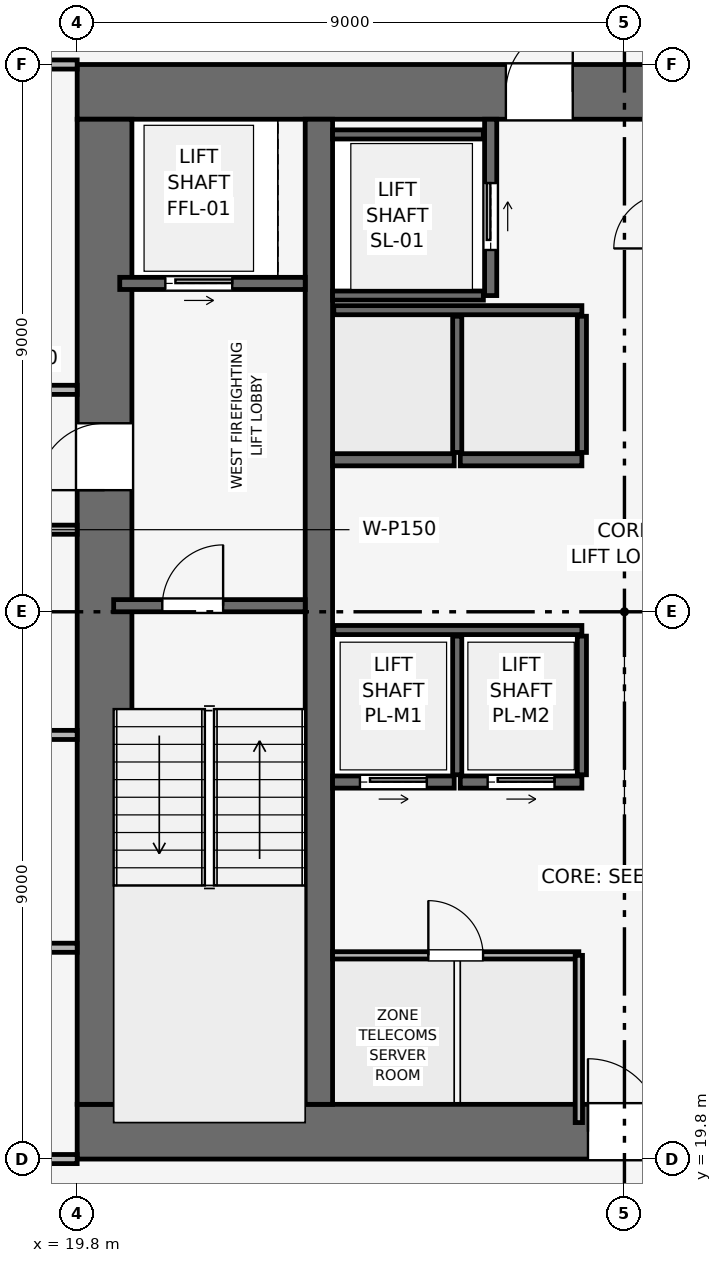
"""IFC4 building model, lengths in metres.
Left out: names, types, materials, properties, quantities, classifications, styles, units other than length and angle.
Written with IfcOpenShell. Run it as: python <this file> out.ifc"""

import sys

from ifc_helpers import new_model, si_unit, direction, frame, frame_2d, origin, place, context, subcontext, project, spatial, rectangle, extrude, element, fill, save


model = new_model("IFC4")
c1 = context("Model", 3, precision=1e-05, world=origin(), true_north=direction((0.0, 1.0)))
c2 = subcontext(c1, "Body", "Model", "MODEL_VIEW")
j1 = project(units=[si_unit("LENGTHUNIT", "METRE"), si_unit("PLANEANGLEUNIT", "RADIAN")], contexts=[c1])
p1 = place(None, origin())
s1 = spatial("IfcSite", under=j1, at=p1, CompositionType="ELEMENT")
p2 = place(p1, origin())
s2 = spatial("IfcBuilding", under=s1, at=p2, CompositionType="ELEMENT")
p3 = place(p2, frame((0.0, 0.0, 190.8)))
s3 = spatial("IfcBuildingStorey", under=s2, at=p3, CompositionType="ELEMENT", Elevation=190.8)
p4 = place(p3, frame((19.8, 20.25, 0.0), z_axis=(0.0, 0.0, 1.0), x_axis=(1.0, 0.0, 0.0)))
e1 = element("IfcWall", 1, at=p4, inside=s3, PredefinedType="SHEAR", context=c2, shape_type="SweptSolid", body=[
    extrude(rectangle(XDim=18.0, YDim=0.9, at=frame_2d((9.0, 0.0))), origin(), (0.0, 0.0, 1.0), 3.75),
])
p5 = place(p4, frame((8.4, 0.0, 0.0)))
e2 = element("IfcOpeningElement", 2, at=p5, cuts=e1, PredefinedType="OPENING", context=c2, shape_type="SweptSolid", body=[
    extrude(rectangle(XDim=1.2, YDim=2.2, at=frame_2d((0.6, 1.1))), frame((0.0, 0.46, 0.0), z_axis=(0.0, -1.0, 0.0), x_axis=(1.0, 0.0, 0.0)), (0.0, 0.0, 1.0), 0.92),
])
p6 = place(p3, frame((19.8, 37.35, 0.0), z_axis=(0.0, 0.0, 1.0), x_axis=(1.0, 0.0, 0.0)))
e3 = element("IfcWall", 3, at=p6, inside=s3, PredefinedType="SHEAR", context=c2, shape_type="SweptSolid", body=[
    extrude(rectangle(XDim=18.0, YDim=0.9, at=frame_2d((9.0, 0.0))), origin(), (0.0, 0.0, 1.0), 3.75),
])
p7 = place(p6, frame((7.05, 0.0, 0.0)))
e4 = element("IfcOpeningElement", 4, at=p7, cuts=e3, PredefinedType="OPENING", context=c2, shape_type="SweptSolid", body=[
    extrude(rectangle(XDim=1.1, YDim=2.15, at=frame_2d((0.55, 1.075))), frame((0.0, 0.46, 0.0), z_axis=(0.0, -1.0, 0.0), x_axis=(1.0, 0.0, 0.0)), (0.0, 0.0, 1.0), 0.92),
])
p8 = place(p3, frame((20.25, 20.7, 0.0), z_axis=(0.0, 0.0, 1.0), x_axis=(0.0, 1.0, 0.0)))
e5 = element("IfcWall", 5, at=p8, inside=s3, PredefinedType="SHEAR", context=c2, shape_type="SweptSolid", body=[
    extrude(rectangle(XDim=16.2, YDim=0.9, at=frame_2d((8.1, 0.0))), origin(), (0.0, 0.0, 1.0), 3.75),
])
p9 = place(p8, frame((10.1, 0.0, 0.0)))
e6 = element("IfcOpeningElement", 6, at=p9, cuts=e5, PredefinedType="OPENING", context=c2, shape_type="SweptSolid", body=[
    extrude(rectangle(XDim=1.1, YDim=2.15, at=frame_2d((0.55, 1.075))), frame((0.0, 0.46, 0.0), z_axis=(0.0, -1.0, 0.0), x_axis=(1.0, 0.0, 0.0)), (0.0, 0.0, 1.0), 0.92),
])
p10 = place(p3, frame((23.775, 20.7, 0.0), z_axis=(0.0, 0.0, 1.0), x_axis=(0.0, 1.0, 0.0)))
e7 = element("IfcWall", 7, at=p10, inside=s3, PredefinedType="SHEAR", context=c2, shape_type="SweptSolid", body=[
    extrude(rectangle(XDim=16.2, YDim=0.45, at=frame_2d((8.1, 0.0))), origin(), (0.0, 0.0, 1.0), 3.75),
])
p11 = place(p3, frame((20.4, 28.9, 0.0), z_axis=(0.0, 0.0, 1.0), x_axis=(1.0, 0.0, 0.0)))
e8 = element("IfcWall", 8, at=p11, inside=s3, PredefinedType="SHEAR", context=c2, shape_type="SweptSolid", body=[
    extrude(rectangle(XDim=3.15, YDim=0.2, at=frame_2d((1.575, 0.0))), origin(), (0.0, 0.0, 1.0), 3.35),
])
p12 = place(p11, frame((0.8, 0.0, 0.0)))
e9 = element("IfcOpeningElement", 9, at=p12, cuts=e8, PredefinedType="OPENING", context=c2, shape_type="SweptSolid", body=[
    extrude(rectangle(XDim=1.0, YDim=2.1, at=frame_2d((0.5, 1.05))), frame((0.0, 0.11, 0.0), z_axis=(0.0, -1.0, 0.0), x_axis=(1.0, 0.0, 0.0)), (0.0, 0.0, 1.0), 0.22),
])
p13 = place(p3, frame((20.5, 34.2, 0.0), z_axis=(0.0, 0.0, 1.0), x_axis=(1.0, 0.0, 0.0)))
e10 = element("IfcWall", 10, at=p13, inside=s3, PredefinedType="SHEAR", context=c2, shape_type="SweptSolid", body=[
    extrude(rectangle(XDim=3.05, YDim=0.2, at=frame_2d((1.525, 0.0))), origin(), (0.0, 0.0, 1.0), 3.35),
])
p14 = place(p13, frame((0.75, 0.0, 0.0)))
e11 = element("IfcOpeningElement", 11, at=p14, cuts=e10, PredefinedType="OPENING", context=c2, shape_type="SweptSolid", body=[
    extrude(rectangle(XDim=1.1, YDim=2.15, at=frame_2d((0.55, 1.075))), frame((0.0, 0.11, 0.0), z_axis=(0.0, -1.0, 0.0), x_axis=(1.0, 0.0, 0.0)), (0.0, 0.0, 1.0), 0.22),
])
p15 = place(p3, frame((26.6, 34.0, 0.0), z_axis=(0.0, 0.0, 1.0), x_axis=(0.0, 1.0, 0.0)))
e12 = element("IfcWall", 12, at=p15, inside=s3, PredefinedType="SHEAR", context=c2, shape_type="SweptSolid", body=[
    extrude(rectangle(XDim=2.9, YDim=0.2, at=frame_2d((1.45, 0.0))), origin(), (0.0, 0.0, 1.0), 3.35),
])
p16 = place(p15, frame((0.75, 0.0, 0.0)))
e13 = element("IfcOpeningElement", 13, at=p16, cuts=e12, PredefinedType="OPENING", context=c2, shape_type="SweptSolid", body=[
    extrude(rectangle(XDim=1.1, YDim=2.15, at=frame_2d((0.55, 1.075))), frame((0.0, 0.11, 0.0), z_axis=(0.0, -1.0, 0.0), x_axis=(1.0, 0.0, 0.0)), (0.0, 0.0, 1.0), 0.22),
])
for number, where, z_axis, x_axis in (
    (14, (24.0, 34.0, 0.0), (0.0, 0.0, 1.0), (1.0, 0.0, 0.0)),
    (15, (24.0, 36.65, 0.0), (0.0, 0.0, 1.0), (1.0, 0.0, 0.0)),
):
    element("IfcWall", number, at=place(p3, frame(where, z_axis=z_axis, x_axis=x_axis)), inside=s3, PredefinedType="SHEAR", context=c2, shape_type="SweptSolid", body=[
        extrude(rectangle(XDim=2.48, YDim=0.15, at=frame_2d((1.24, 0.0))), origin(), (0.0, 0.0, 1.0), 3.35),
    ])
p17 = place(p3, frame((24.0, 26.0, 0.0), z_axis=(0.0, 0.0, 1.0), x_axis=(1.0, 0.0, 0.0)))
e16 = element("IfcWall", 16, at=p17, inside=s3, PredefinedType="SHEAR", context=c2, shape_type="SweptSolid", body=[
    extrude(rectangle(XDim=2.0, YDim=0.2, at=frame_2d((1.0, 0.0))), origin(), (0.0, 0.0, 1.0), 3.35),
])
p18 = place(p17, frame((0.45, 0.0, 0.0)))
e17 = element("IfcOpeningElement", 17, at=p18, cuts=e16, PredefinedType="OPENING", context=c2, shape_type="SweptSolid", body=[
    extrude(rectangle(XDim=1.1, YDim=2.15, at=frame_2d((0.55, 1.075))), frame((0.0, 0.11, 0.0), z_axis=(0.0, -1.0, 0.0), x_axis=(1.0, 0.0, 0.0)), (0.0, 0.0, 1.0), 0.22),
])
p19 = place(p3, frame((26.1, 26.0, 0.0), z_axis=(0.0, 0.0, 1.0), x_axis=(1.0, 0.0, 0.0)))
e18 = element("IfcWall", 18, at=p19, inside=s3, PredefinedType="SHEAR", context=c2, shape_type="SweptSolid", body=[
    extrude(rectangle(XDim=2.0, YDim=0.2, at=frame_2d((1.0, 0.0))), origin(), (0.0, 0.0, 1.0), 3.35),
])
p20 = place(p19, frame((0.45, 0.0, 0.0)))
e19 = element("IfcOpeningElement", 19, at=p20, cuts=e18, PredefinedType="OPENING", context=c2, shape_type="SweptSolid", body=[
    extrude(rectangle(XDim=1.1, YDim=2.15, at=frame_2d((0.55, 1.075))), frame((0.0, 0.11, 0.0), z_axis=(0.0, -1.0, 0.0), x_axis=(1.0, 0.0, 0.0)), (0.0, 0.0, 1.0), 0.22),
])
for number, where, z_axis, x_axis in (
    (20, (24.0, 31.3, 0.0), (0.0, 0.0, 1.0), (1.0, 0.0, 0.0)),
    (21, (26.1, 31.3, 0.0), (0.0, 0.0, 1.0), (1.0, 0.0, 0.0)),
):
    element("IfcWall", number, at=place(p3, frame(where, z_axis=z_axis, x_axis=x_axis)), inside=s3, PredefinedType="SHEAR", context=c2, shape_type="SweptSolid", body=[
        extrude(rectangle(XDim=2.0, YDim=0.2, at=frame_2d((1.0, 0.0))), origin(), (0.0, 0.0, 1.0), 3.35),
    ])
p21 = place(p3, frame((24.02, 28.5, 0.0), z_axis=(0.0, 0.0, 1.0), x_axis=(1.0, 0.0, 0.0)))
e22 = element("IfcWall", 22, at=p21, inside=s3, PredefinedType="SHEAR", context=c2, shape_type="SweptSolid", body=[
    extrude(rectangle(XDim=4.08, YDim=0.15, at=frame_2d((2.04, 0.0))), origin(), (0.0, 0.0, 1.0), 3.35),
])
for number, where, z_axis, x_axis in (
    (23, (26.05, 26.12, 0.0), (0.0, 0.0, 1.0), (0.0, 1.0, 0.0)),
    (24, (28.1, 26.12, 0.0), (0.0, 0.0, 1.0), (0.0, 1.0, 0.0)),
):
    element("IfcWall", number, at=place(p3, frame(where, z_axis=z_axis, x_axis=x_axis)), inside=s3, PredefinedType="SHEAR", context=c2, shape_type="SweptSolid", body=[
        extrude(rectangle(XDim=2.28, YDim=0.15, at=frame_2d((1.14, 0.0))), origin(), (0.0, 0.0, 1.0), 3.35),
    ])
p22 = place(p3, frame((24.02, 33.76, 0.0), z_axis=(0.0, 0.0, 1.0), x_axis=(1.0, 0.0, 0.0)))
e25 = element("IfcWall", 25, at=p22, inside=s3, PredefinedType="SHEAR", context=c2, shape_type="SweptSolid", body=[
    extrude(rectangle(XDim=4.08, YDim=0.15, at=frame_2d((2.04, 0.0))), origin(), (0.0, 0.0, 1.0), 3.35),
])
for number, where, z_axis, x_axis in (
    (26, (26.05, 31.42, 0.0), (0.0, 0.0, 1.0), (0.0, 1.0, 0.0)),
    (27, (28.1, 31.42, 0.0), (0.0, 0.0, 1.0), (0.0, 1.0, 0.0)),
):
    element("IfcWall", number, at=place(p3, frame(where, z_axis=z_axis, x_axis=x_axis)), inside=s3, PredefinedType="SHEAR", context=c2, shape_type="SweptSolid", body=[
        extrude(rectangle(XDim=2.24, YDim=0.15, at=frame_2d((1.12, 0.0))), origin(), (0.0, 0.0, 1.0), 3.35),
    ])
p23 = place(p3, frame((24.0, 23.15, 0.0), z_axis=(0.0, 0.0, 1.0), x_axis=(1.0, 0.0, 0.0)))
e28 = element("IfcWall", 28, at=p23, inside=s3, PredefinedType="PARTITIONING", context=c2, shape_type="SweptSolid", body=[
    extrude(rectangle(XDim=4.05, YDim=0.12, at=frame_2d((2.025, 0.0))), origin(), (0.0, 0.0, 1.0), 3.35),
])
p24 = place(p23, frame((1.575, 0.0, 0.0)))
e29 = element("IfcOpeningElement", 29, at=p24, cuts=e28, PredefinedType="OPENING", context=c2, shape_type="SweptSolid", body=[
    extrude(rectangle(XDim=0.9, YDim=2.1, at=frame_2d((0.45, 1.05))), frame((0.0, 0.07, 0.0), z_axis=(0.0, -1.0, 0.0), x_axis=(1.0, 0.0, 0.0)), (0.0, 0.0, 1.0), 0.14),
])
p25 = place(p3, frame((28.05, 20.4, 0.0), z_axis=(0.0, 0.0, 1.0), x_axis=(0.0, 1.0, 0.0)))
e30 = element("IfcWall", 30, at=p25, inside=s3, PredefinedType="PARTITIONING", context=c2, shape_type="SweptSolid", body=[
    extrude(rectangle(XDim=2.75, YDim=0.12, at=frame_2d((1.375, 0.0))), origin(), (0.0, 0.0, 1.0), 3.35),
])
p26 = place(p3, frame((15.4, 19.8, 0.0), z_axis=(0.0, 0.0, 1.0), x_axis=(1.0, 0.0, 0.0)))
e31 = element("IfcWall", 31, at=p26, inside=s3, PredefinedType="PARTITIONING", context=c2, shape_type="SweptSolid", body=[
    extrude(rectangle(XDim=4.4, YDim=0.15, at=frame_2d((2.2, 0.0))), origin(), (0.0, 0.0, 1.0), 2.885),
])
for number, where, z_axis, x_axis in (
    (32, (15.4, 23.275, 0.0), (0.0, 0.0, 1.0), (1.0, 0.0, 0.0)),
    (33, (15.4, 26.775, 0.0), (0.0, 0.0, 1.0), (1.0, 0.0, 0.0)),
    (34, (15.4, 30.15, 0.0), (0.0, 0.0, 1.0), (1.0, 0.0, 0.0)),
    (35, (15.4, 32.45, 0.0), (0.0, 0.0, 1.0), (1.0, 0.0, 0.0)),
):
    element("IfcWall", number, at=place(p3, frame(where, z_axis=z_axis, x_axis=x_axis)), inside=s3, PredefinedType="PARTITIONING", context=c2, shape_type="SweptSolid", body=[
        extrude(rectangle(XDim=4.4, YDim=0.15, at=frame_2d((2.2, 0.0))), origin(), (0.0, 0.0, 1.0), 3.35),
    ])
p27 = place(p3, frame((15.4, 37.8, 0.0), z_axis=(0.0, 0.0, 1.0), x_axis=(1.0, 0.0, 0.0)))
e36 = element("IfcWall", 36, at=p27, inside=s3, PredefinedType="PARTITIONING", context=c2, shape_type="SweptSolid", body=[
    extrude(rectangle(XDim=4.4, YDim=0.15, at=frame_2d((2.2, 0.0))), origin(), (0.0, 0.0, 1.0), 2.885),
])
p28 = place(p12, origin())
e37 = element("IfcDoor", 37, at=p28, inside=s3, OperationType="SINGLE_SWING_RIGHT", PredefinedType="DOOR", context=c2, shape_type="SweptSolid", body=[
    extrude(rectangle(XDim=1.0, YDim=2.1, at=frame_2d((0.5, 1.05))), frame((0.0, 0.025, 0.0), z_axis=(0.0, -1.0, 0.0), x_axis=(1.0, 0.0, 0.0)), (0.0, 0.0, 1.0), 0.05),
])
fill(e9, e37)
p29 = place(p14, origin())
e38 = element("IfcDoor", 38, at=p29, inside=s3, OperationType="SLIDING_TO_RIGHT", PredefinedType="DOOR", context=c2, shape_type="SweptSolid", body=[
    extrude(rectangle(XDim=1.1, YDim=2.15, at=frame_2d((0.55, 1.075))), frame((0.0, 0.025, 0.0), z_axis=(0.0, -1.0, 0.0), x_axis=(1.0, 0.0, 0.0)), (0.0, 0.0, 1.0), 0.05),
])
fill(e11, e38)
p30 = place(p16, origin())
e39 = element("IfcDoor", 39, at=p30, inside=s3, OperationType="SLIDING_TO_RIGHT", PredefinedType="DOOR", context=c2, shape_type="SweptSolid", body=[
    extrude(rectangle(XDim=1.1, YDim=2.15, at=frame_2d((0.55, 1.075))), frame((0.0, 0.025, 0.0), z_axis=(0.0, -1.0, 0.0), x_axis=(1.0, 0.0, 0.0)), (0.0, 0.0, 1.0), 0.05),
])
fill(e13, e39)
p31 = place(p18, origin())
e40 = element("IfcDoor", 40, at=p31, inside=s3, OperationType="SLIDING_TO_RIGHT", PredefinedType="DOOR", context=c2, shape_type="SweptSolid", body=[
    extrude(rectangle(XDim=1.1, YDim=2.15, at=frame_2d((0.55, 1.075))), frame((0.0, 0.025, 0.0), z_axis=(0.0, -1.0, 0.0), x_axis=(1.0, 0.0, 0.0)), (0.0, 0.0, 1.0), 0.05),
])
fill(e17, e40)
p32 = place(p20, origin())
e41 = element("IfcDoor", 41, at=p32, inside=s3, OperationType="SLIDING_TO_RIGHT", PredefinedType="DOOR", context=c2, shape_type="SweptSolid", body=[
    extrude(rectangle(XDim=1.1, YDim=2.15, at=frame_2d((0.55, 1.075))), frame((0.0, 0.025, 0.0), z_axis=(0.0, -1.0, 0.0), x_axis=(1.0, 0.0, 0.0)), (0.0, 0.0, 1.0), 0.05),
])
fill(e19, e41)
p33 = place(p24, origin())
e42 = element("IfcDoor", 42, at=p33, inside=s3, OperationType="SINGLE_SWING_LEFT", PredefinedType="DOOR", context=c2, shape_type="SweptSolid", body=[
    extrude(rectangle(XDim=0.9, YDim=2.1, at=frame_2d((0.45, 1.05))), frame((0.0, 0.025, 0.0), z_axis=(0.0, -1.0, 0.0), x_axis=(1.0, 0.0, 0.0)), (0.0, 0.0, 1.0), 0.05),
])
fill(e29, e42)
p34 = place(p9, origin())
e43 = element("IfcDoor", 43, at=p34, inside=s3, OperationType="SINGLE_SWING_LEFT", PredefinedType="DOOR", context=c2, shape_type="SweptSolid", body=[
    extrude(rectangle(XDim=1.1, YDim=2.15, at=frame_2d((0.55, 1.075))), frame((0.0, 0.025, 0.0), z_axis=(0.0, -1.0, 0.0), x_axis=(1.0, 0.0, 0.0)), (0.0, 0.0, 1.0), 0.05),
])
fill(e6, e43)
p35 = place(p5, origin())
e44 = element("IfcDoor", 44, at=p35, inside=s3, OperationType="SINGLE_SWING_LEFT", PredefinedType="DOOR", context=c2, shape_type="SweptSolid", body=[
    extrude(rectangle(XDim=1.2, YDim=2.2, at=frame_2d((0.6, 1.1))), frame((0.0, 0.025, 0.0), z_axis=(0.0, -1.0, 0.0), x_axis=(1.0, 0.0, 0.0)), (0.0, 0.0, 1.0), 0.05),
])
fill(e2, e44)
p36 = place(p7, origin())
e45 = element("IfcDoor", 45, at=p36, inside=s3, OperationType="SINGLE_SWING_RIGHT", PredefinedType="DOOR", context=c2, shape_type="SweptSolid", body=[
    extrude(rectangle(XDim=1.1, YDim=2.15, at=frame_2d((0.55, 1.075))), frame((0.0, 0.025, 0.0), z_axis=(0.0, -1.0, 0.0), x_axis=(1.0, 0.0, 0.0)), (0.0, 0.0, 1.0), 0.05),
])
fill(e4, e45)
save(model, sys.argv[1])
